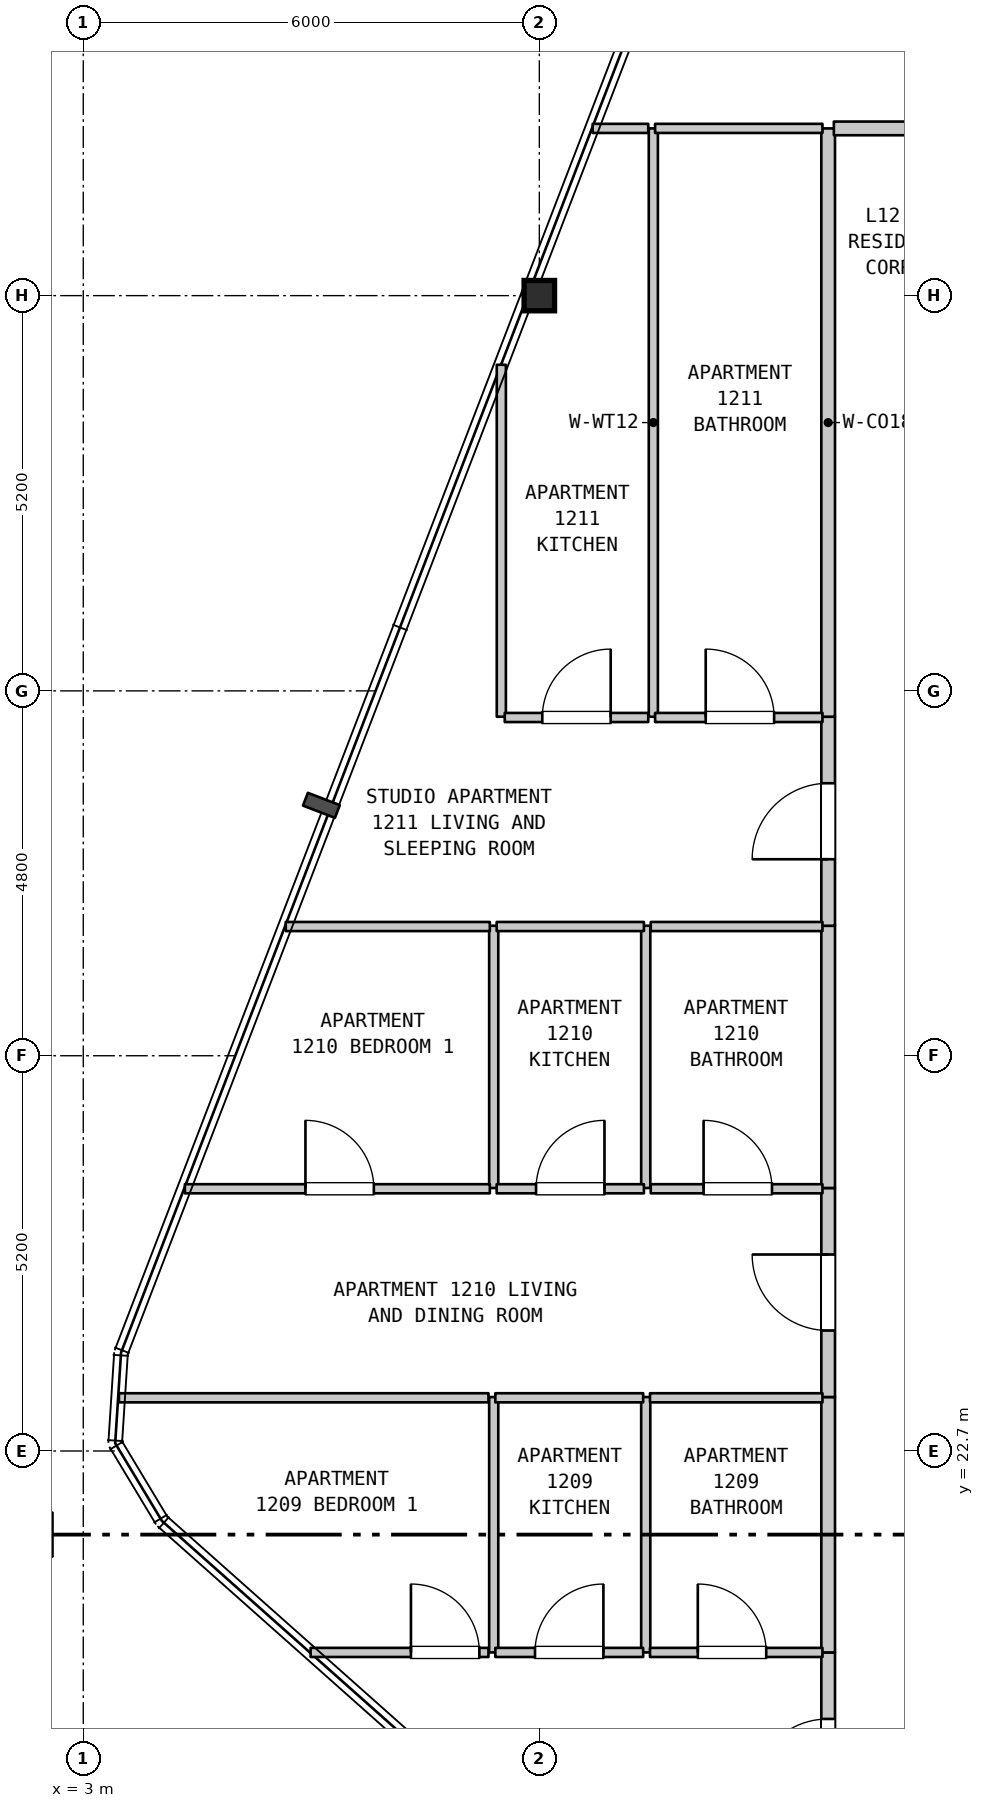
"""IFC4 building model, lengths in metres.
Left out: names, types, materials, properties, quantities, classifications, styles, units other than length and angle.
Written with IfcOpenShell. Run it as: python <this file> out.ifc"""

import sys

from ifc_helpers import new_model, si_unit, direction, frame, frame_2d, origin, origin_2d, place, context, subcontext, project, spatial, rectangle, i_section, extrude, element, fill, save


model = new_model("IFC4")
c1 = context("Model", 3, precision=1e-05, world=origin(), true_north=direction((0.0, 1.0)))
c2 = subcontext(c1, "Body", "Model", "MODEL_VIEW")
j1 = project(units=[si_unit("LENGTHUNIT", "METRE"), si_unit("PLANEANGLEUNIT", "RADIAN")], contexts=[c1])
p1 = place(None, origin())
s1 = spatial("IfcSite", under=j1, at=p1, CompositionType="ELEMENT")
p2 = place(p1, origin())
s2 = spatial("IfcBuilding", under=s1, at=p2, CompositionType="ELEMENT")
p3 = place(p2, frame((0.0, 0.0, 53.6)))
s3 = spatial("IfcBuildingStorey", under=s2, at=p3, CompositionType="ELEMENT", Elevation=53.6)
p4 = place(p3, frame((9.0, 37.9, 0.0), z_axis=(0.0, 0.0, 1.0), x_axis=(1.0, 0.0, 0.0)))
e1 = element("IfcColumn", 1, at=p4, inside=s3, PredefinedType="COLUMN", context=c2, shape_type="SweptSolid", body=[
    extrude(i_section(OverallWidth=0.401, OverallDepth=0.399, WebThickness=0.025, FlangeThickness=0.04, FilletRadius=0.015, at=origin_2d()), origin(), (0.0, 0.0, 1.0), 3.7),
])
p5 = place(p3, frame((8.4, 20.05, 0.0), z_axis=(0.0, 0.0, 1.0), x_axis=(0.0, 1.0, 0.0)))
e2 = element("IfcWall", 2, at=p5, inside=s3, PredefinedType="PARTITIONING", context=c2, shape_type="SweptSolid", body=[
    extrude(rectangle(XDim=3.36, YDim=0.12, at=frame_2d((1.68, 0.0))), origin(), (0.0, 0.0, 1.0), 3.385),
])
p6 = place(p3, frame((8.4, 26.16, 0.0), z_axis=(0.0, 0.0, 1.0), x_axis=(0.0, 1.0, 0.0)))
e3 = element("IfcWall", 3, at=p6, inside=s3, PredefinedType="PARTITIONING", context=c2, shape_type="SweptSolid", body=[
    extrude(rectangle(XDim=3.45, YDim=0.12, at=frame_2d((1.725, 0.0))), origin(), (0.0, 0.0, 1.0), 3.385),
])
p7 = place(p3, frame((8.5, 32.36, 0.0), z_axis=(0.0, 0.0, 1.0), x_axis=(0.0, 1.0, 0.0)))
e4 = element("IfcWall", 4, at=p7, inside=s3, PredefinedType="PARTITIONING", context=c2, shape_type="SweptSolid", body=[
    extrude(rectangle(XDim=4.63, YDim=0.12, at=frame_2d((2.315, 0.0))), origin(), (0.0, 0.0, 1.0), 3.385),
])
p8 = place(p3, frame((10.4, 20.05, 0.0), z_axis=(0.0, 0.0, 1.0), x_axis=(0.0, 1.0, 0.0)))
e5 = element("IfcWall", 5, at=p8, inside=s3, PredefinedType="PARTITIONING", context=c2, shape_type="SweptSolid", body=[
    extrude(rectangle(XDim=3.36, YDim=0.12, at=frame_2d((1.68, 0.0))), origin(), (0.0, 0.0, 1.0), 3.385),
])
p9 = place(p3, frame((10.4, 26.16, 0.0), z_axis=(0.0, 0.0, 1.0), x_axis=(0.0, 1.0, 0.0)))
e6 = element("IfcWall", 6, at=p9, inside=s3, PredefinedType="PARTITIONING", context=c2, shape_type="SweptSolid", body=[
    extrude(rectangle(XDim=3.45, YDim=0.12, at=frame_2d((1.725, 0.0))), origin(), (0.0, 0.0, 1.0), 3.385),
])
p10 = place(p3, frame((10.5, 32.36, 0.0), z_axis=(0.0, 0.0, 1.0), x_axis=(0.0, 1.0, 0.0)))
e7 = element("IfcWall", 7, at=p10, inside=s3, PredefinedType="PARTITIONING", context=c2, shape_type="SweptSolid", body=[
    extrude(rectangle(XDim=7.74, YDim=0.12, at=frame_2d((3.87, 0.0))), origin(), (0.0, 0.0, 1.0), 3.385),
])
p11 = place(p3, frame((12.8, 17.3, 0.0), z_axis=(0.0, 0.0, 1.0), x_axis=(0.0, 1.0, 0.0)))
e8 = element("IfcWall", 8, at=p11, inside=s3, PredefinedType="STANDARD", context=c2, shape_type="SweptSolid", body=[
    extrude(rectangle(XDim=2.75, YDim=0.18, at=frame_2d((1.375, 0.0))), origin(), (0.0, 0.0, 1.0), 3.385),
])
p12 = place(p11, frame((0.875, 0.0, 0.0)))
e9 = element("IfcOpeningElement", 9, at=p12, cuts=e8, PredefinedType="OPENING", context=c2, shape_type="SweptSolid", body=[
    extrude(rectangle(XDim=1.0, YDim=2.15, at=frame_2d((0.5, 1.075))), frame((0.0, 0.1, 0.0), z_axis=(0.0, -1.0, 0.0), x_axis=(1.0, 0.0, 0.0)), (0.0, 0.0, 1.0), 0.2),
])
p13 = place(p3, frame((12.8, 20.05, 0.0), z_axis=(0.0, 0.0, 1.0), x_axis=(0.0, 1.0, 0.0)))
e10 = element("IfcWall", 10, at=p13, inside=s3, PredefinedType="STANDARD", context=c2, shape_type="SweptSolid", body=[
    extrude(rectangle(XDim=3.36, YDim=0.18, at=frame_2d((1.68, 0.0))), origin(), (0.0, 0.0, 1.0), 3.385),
])
p14 = place(p3, frame((12.8, 23.41, 0.0), z_axis=(0.0, 0.0, 1.0), x_axis=(0.0, 1.0, 0.0)))
e11 = element("IfcWall", 11, at=p14, inside=s3, PredefinedType="STANDARD", context=c2, shape_type="SweptSolid", body=[
    extrude(rectangle(XDim=2.75, YDim=0.18, at=frame_2d((1.375, 0.0))), origin(), (0.0, 0.0, 1.0), 3.385),
])
p15 = place(p14, frame((0.875, 0.0, 0.0)))
e12 = element("IfcOpeningElement", 12, at=p15, cuts=e11, PredefinedType="OPENING", context=c2, shape_type="SweptSolid", body=[
    extrude(rectangle(XDim=1.0, YDim=2.15, at=frame_2d((0.5, 1.075))), frame((0.0, 0.1, 0.0), z_axis=(0.0, -1.0, 0.0), x_axis=(1.0, 0.0, 0.0)), (0.0, 0.0, 1.0), 0.2),
])
p16 = place(p3, frame((12.8, 26.16, 0.0), z_axis=(0.0, 0.0, 1.0), x_axis=(0.0, 1.0, 0.0)))
e13 = element("IfcWall", 13, at=p16, inside=s3, PredefinedType="STANDARD", context=c2, shape_type="SweptSolid", body=[
    extrude(rectangle(XDim=3.45, YDim=0.18, at=frame_2d((1.725, 0.0))), origin(), (0.0, 0.0, 1.0), 3.385),
])
p17 = place(p3, frame((12.8, 29.61, 0.0), z_axis=(0.0, 0.0, 1.0), x_axis=(0.0, 1.0, 0.0)))
e14 = element("IfcWall", 14, at=p17, inside=s3, PredefinedType="STANDARD", context=c2, shape_type="SweptSolid", body=[
    extrude(rectangle(XDim=2.75, YDim=0.18, at=frame_2d((1.375, 0.0))), origin(), (0.0, 0.0, 1.0), 3.385),
])
p18 = place(p17, frame((0.875, 0.0, 0.0)))
e15 = element("IfcOpeningElement", 15, at=p18, cuts=e14, PredefinedType="OPENING", context=c2, shape_type="SweptSolid", body=[
    extrude(rectangle(XDim=1.0, YDim=2.15, at=frame_2d((0.5, 1.075))), frame((0.0, 0.1, 0.0), z_axis=(0.0, -1.0, 0.0), x_axis=(1.0, 0.0, 0.0)), (0.0, 0.0, 1.0), 0.2),
])
p19 = place(p3, frame((12.8, 32.36, 0.0), z_axis=(0.0, 0.0, 1.0), x_axis=(0.0, 1.0, 0.0)))
e16 = element("IfcWall", 16, at=p19, inside=s3, PredefinedType="STANDARD", context=c2, shape_type="SweptSolid", body=[
    extrude(rectangle(XDim=7.74, YDim=0.18, at=frame_2d((3.87, 0.0))), origin(), (0.0, 0.0, 1.0), 3.385),
])
p20 = place(p3, frame((5.991, 20.05, 0.0), z_axis=(0.0, 0.0, 1.0), x_axis=(1.0, 0.0, 0.0)))
e17 = element("IfcWall", 17, at=p20, inside=s3, PredefinedType="PARTITIONING", context=c2, shape_type="SweptSolid", body=[
    extrude(rectangle(XDim=2.34, YDim=0.12, at=frame_2d((1.17, 0.0))), origin(), (0.0, 0.0, 1.0), 3.385),
])
p21 = place(p20, frame((1.32, 0.0, 0.0)))
e18 = element("IfcOpeningElement", 18, at=p21, cuts=e17, PredefinedType="OPENING", context=c2, shape_type="SweptSolid", body=[
    extrude(rectangle(XDim=0.9, YDim=2.15, at=frame_2d((0.45, 1.075))), frame((0.0, 0.07, 0.0), z_axis=(0.0, -1.0, 0.0), x_axis=(1.0, 0.0, 0.0)), (0.0, 0.0, 1.0), 0.14),
])
p22 = place(p3, frame((8.421, 20.05, 0.0), z_axis=(0.0, 0.0, 1.0), x_axis=(1.0, 0.0, 0.0)))
e19 = element("IfcWall", 19, at=p22, inside=s3, PredefinedType="PARTITIONING", context=c2, shape_type="SweptSolid", body=[
    extrude(rectangle(XDim=1.945, YDim=0.12, at=frame_2d((0.973, 0.0))), origin(), (0.0, 0.0, 1.0), 3.385),
])
p23 = place(p22, frame((0.522, 0.0, 0.0)))
e20 = element("IfcOpeningElement", 20, at=p23, cuts=e19, PredefinedType="OPENING", context=c2, shape_type="SweptSolid", body=[
    extrude(rectangle(XDim=0.9, YDim=2.15, at=frame_2d((0.45, 1.075))), frame((0.0, 0.07, 0.0), z_axis=(0.0, -1.0, 0.0), x_axis=(1.0, 0.0, 0.0)), (0.0, 0.0, 1.0), 0.14),
])
p24 = place(p3, frame((10.456, 20.05, 0.0), z_axis=(0.0, 0.0, 1.0), x_axis=(1.0, 0.0, 0.0)))
e21 = element("IfcWall", 21, at=p24, inside=s3, PredefinedType="PARTITIONING", context=c2, shape_type="SweptSolid", body=[
    extrude(rectangle(XDim=2.269, YDim=0.12, at=frame_2d((1.135, 0.0))), origin(), (0.0, 0.0, 1.0), 3.385),
])
p25 = place(p24, frame((0.629, 0.0, 0.0)))
e22 = element("IfcOpeningElement", 22, at=p25, cuts=e21, PredefinedType="OPENING", context=c2, shape_type="SweptSolid", body=[
    extrude(rectangle(XDim=0.9, YDim=2.1, at=frame_2d((0.45, 1.05))), frame((0.0, 0.07, 0.0), z_axis=(0.0, -1.0, 0.0), x_axis=(1.0, 0.0, 0.0)), (0.0, 0.0, 1.0), 0.14),
])
p26 = place(p3, frame((3.469, 23.4, 0.0), z_axis=(0.0, 0.0, 1.0), x_axis=(1.0, 0.0, 0.0)))
e23 = element("IfcWall", 23, at=p26, inside=s3, PredefinedType="PARTITIONING", context=c2, shape_type="SweptSolid", body=[
    extrude(rectangle(XDim=4.862, YDim=0.12, at=frame_2d((2.431, 0.0))), origin(), (0.0, 0.0, 1.0), 3.385),
])
p27 = place(p3, frame((8.421, 23.4, 0.0), z_axis=(0.0, 0.0, 1.0), x_axis=(1.0, 0.0, 0.0)))
e24 = element("IfcWall", 24, at=p27, inside=s3, PredefinedType="PARTITIONING", context=c2, shape_type="SweptSolid", body=[
    extrude(rectangle(XDim=1.945, YDim=0.12, at=frame_2d((0.973, 0.0))), origin(), (0.0, 0.0, 1.0), 3.385),
])
p28 = place(p3, frame((10.456, 23.4, 0.0), z_axis=(0.0, 0.0, 1.0), x_axis=(1.0, 0.0, 0.0)))
e25 = element("IfcWall", 25, at=p28, inside=s3, PredefinedType="PARTITIONING", context=c2, shape_type="SweptSolid", body=[
    extrude(rectangle(XDim=2.269, YDim=0.12, at=frame_2d((1.135, 0.0))), origin(), (0.0, 0.0, 1.0), 3.385),
])
p29 = place(p3, frame((4.337, 26.15, 0.0), z_axis=(0.0, 0.0, 1.0), x_axis=(1.0, 0.0, 0.0)))
e26 = element("IfcWall", 26, at=p29, inside=s3, PredefinedType="PARTITIONING", context=c2, shape_type="SweptSolid", body=[
    extrude(rectangle(XDim=4.012, YDim=0.12, at=frame_2d((2.006, 0.0))), origin(), (0.0, 0.0, 1.0), 3.385),
])
p30 = place(p29, frame((1.586, 0.0, 0.0)))
e27 = element("IfcOpeningElement", 27, at=p30, cuts=e26, PredefinedType="OPENING", context=c2, shape_type="SweptSolid", body=[
    extrude(rectangle(XDim=0.9, YDim=2.15, at=frame_2d((0.45, 1.075))), frame((0.0, 0.07, 0.0), z_axis=(0.0, -1.0, 0.0), x_axis=(1.0, 0.0, 0.0)), (0.0, 0.0, 1.0), 0.14),
])
p31 = place(p3, frame((8.439, 26.15, 0.0), z_axis=(0.0, 0.0, 1.0), x_axis=(1.0, 0.0, 0.0)))
e28 = element("IfcWall", 28, at=p31, inside=s3, PredefinedType="PARTITIONING", context=c2, shape_type="SweptSolid", body=[
    extrude(rectangle(XDim=1.937, YDim=0.12, at=frame_2d((0.969, 0.0))), origin(), (0.0, 0.0, 1.0), 3.385),
])
p32 = place(p31, frame((0.518, 0.0, 0.0)))
e29 = element("IfcOpeningElement", 29, at=p32, cuts=e28, PredefinedType="OPENING", context=c2, shape_type="SweptSolid", body=[
    extrude(rectangle(XDim=0.9, YDim=2.15, at=frame_2d((0.45, 1.075))), frame((0.0, 0.07, 0.0), z_axis=(0.0, -1.0, 0.0), x_axis=(1.0, 0.0, 0.0)), (0.0, 0.0, 1.0), 0.14),
])
p33 = place(p3, frame((10.466, 26.15, 0.0), z_axis=(0.0, 0.0, 1.0), x_axis=(1.0, 0.0, 0.0)))
e30 = element("IfcWall", 30, at=p33, inside=s3, PredefinedType="PARTITIONING", context=c2, shape_type="SweptSolid", body=[
    extrude(rectangle(XDim=2.259, YDim=0.12, at=frame_2d((1.129, 0.0))), origin(), (0.0, 0.0, 1.0), 3.385),
])
p34 = place(p33, frame((0.695, 0.0, 0.0)))
e31 = element("IfcOpeningElement", 31, at=p34, cuts=e30, PredefinedType="OPENING", context=c2, shape_type="SweptSolid", body=[
    extrude(rectangle(XDim=0.9, YDim=2.1, at=frame_2d((0.45, 1.05))), frame((0.0, 0.07, 0.0), z_axis=(0.0, -1.0, 0.0), x_axis=(1.0, 0.0, 0.0)), (0.0, 0.0, 1.0), 0.14),
])
p35 = place(p3, frame((5.664, 29.6, 0.0), z_axis=(0.0, 0.0, 1.0), x_axis=(1.0, 0.0, 0.0)))
e32 = element("IfcWall", 32, at=p35, inside=s3, PredefinedType="PARTITIONING", context=c2, shape_type="SweptSolid", body=[
    extrude(rectangle(XDim=2.685, YDim=0.12, at=frame_2d((1.343, 0.0))), origin(), (0.0, 0.0, 1.0), 3.385),
])
p36 = place(p3, frame((8.439, 29.6, 0.0), z_axis=(0.0, 0.0, 1.0), x_axis=(1.0, 0.0, 0.0)))
e33 = element("IfcWall", 33, at=p36, inside=s3, PredefinedType="PARTITIONING", context=c2, shape_type="SweptSolid", body=[
    extrude(rectangle(XDim=1.937, YDim=0.12, at=frame_2d((0.969, 0.0))), origin(), (0.0, 0.0, 1.0), 3.385),
])
p37 = place(p3, frame((10.466, 29.6, 0.0), z_axis=(0.0, 0.0, 1.0), x_axis=(1.0, 0.0, 0.0)))
e34 = element("IfcWall", 34, at=p37, inside=s3, PredefinedType="PARTITIONING", context=c2, shape_type="SweptSolid", body=[
    extrude(rectangle(XDim=2.259, YDim=0.12, at=frame_2d((1.129, 0.0))), origin(), (0.0, 0.0, 1.0), 3.385),
])
p38 = place(p3, frame((8.545, 32.35, 0.0), z_axis=(0.0, 0.0, 1.0), x_axis=(1.0, 0.0, 0.0)))
e35 = element("IfcWall", 35, at=p38, inside=s3, PredefinedType="PARTITIONING", context=c2, shape_type="SweptSolid", body=[
    extrude(rectangle(XDim=1.888, YDim=0.12, at=frame_2d((0.944, 0.0))), origin(), (0.0, 0.0, 1.0), 3.385),
])
p39 = place(p38, frame((0.494, 0.0, 0.0)))
e36 = element("IfcOpeningElement", 36, at=p39, cuts=e35, PredefinedType="OPENING", context=c2, shape_type="SweptSolid", body=[
    extrude(rectangle(XDim=0.9, YDim=2.15, at=frame_2d((0.45, 1.075))), frame((0.0, 0.07, 0.0), z_axis=(0.0, -1.0, 0.0), x_axis=(1.0, 0.0, 0.0)), (0.0, 0.0, 1.0), 0.14),
])
p40 = place(p3, frame((10.523, 32.35, 0.0), z_axis=(0.0, 0.0, 1.0), x_axis=(1.0, 0.0, 0.0)))
e37 = element("IfcWall", 37, at=p40, inside=s3, PredefinedType="PARTITIONING", context=c2, shape_type="SweptSolid", body=[
    extrude(rectangle(XDim=2.202, YDim=0.12, at=frame_2d((1.101, 0.0))), origin(), (0.0, 0.0, 1.0), 3.385),
])
p41 = place(p40, frame((0.666, 0.0, 0.0)))
e38 = element("IfcOpeningElement", 38, at=p41, cuts=e37, PredefinedType="OPENING", context=c2, shape_type="SweptSolid", body=[
    extrude(rectangle(XDim=0.9, YDim=2.1, at=frame_2d((0.45, 1.05))), frame((0.0, 0.07, 0.0), z_axis=(0.0, -1.0, 0.0), x_axis=(1.0, 0.0, 0.0)), (0.0, 0.0, 1.0), 0.14),
])
p42 = place(p3, frame((9.702, 40.1, 0.0), z_axis=(0.0, 0.0, 1.0), x_axis=(1.0, 0.0, 0.0)))
e39 = element("IfcWall", 39, at=p42, inside=s3, PredefinedType="PARTITIONING", context=c2, shape_type="SweptSolid", body=[
    extrude(rectangle(XDim=0.731, YDim=0.12, at=frame_2d((0.366, 0.0))), origin(), (0.0, 0.0, 1.0), 3.385),
])
p43 = place(p3, frame((10.523, 40.1, 0.0), z_axis=(0.0, 0.0, 1.0), x_axis=(1.0, 0.0, 0.0)))
e40 = element("IfcWall", 40, at=p43, inside=s3, PredefinedType="PARTITIONING", context=c2, shape_type="SweptSolid", body=[
    extrude(rectangle(XDim=2.202, YDim=0.12, at=frame_2d((1.101, 0.0))), origin(), (0.0, 0.0, 1.0), 3.385),
])
p44 = place(p3, frame((12.875, 40.1, 0.0), z_axis=(0.0, 0.0, 1.0), x_axis=(1.0, 0.0, 0.0)))
e41 = element("IfcWall", 41, at=p44, inside=s3, PredefinedType="STANDARD", context=c2, shape_type="SweptSolid", body=[
    extrude(rectangle(XDim=3.23, YDim=0.18, at=frame_2d((1.615, 0.0))), origin(), (0.0, 0.0, 1.0), 3.385),
])
p45 = place(p44, frame((1.029, 0.0, 0.0)))
e42 = element("IfcOpeningElement", 42, at=p45, cuts=e41, PredefinedType="OPENING", context=c2, shape_type="SweptSolid", body=[
    extrude(rectangle(XDim=1.0, YDim=2.15, at=frame_2d((0.5, 1.075))), frame((0.0, 0.1, 0.0), z_axis=(0.0, -1.0, 0.0), x_axis=(1.0, 0.0, 0.0)), (0.0, 0.0, 1.0), 0.2),
])
p46 = place(p12, origin())
e43 = element("IfcDoor", 43, at=p46, inside=s3, OperationType="SINGLE_SWING_LEFT", PredefinedType="DOOR", context=c2, shape_type="SweptSolid", body=[
    extrude(rectangle(XDim=1.0, YDim=2.15, at=frame_2d((0.5, 1.075))), frame((0.0, 0.025, 0.0), z_axis=(0.0, -1.0, 0.0), x_axis=(1.0, 0.0, 0.0)), (0.0, 0.0, 1.0), 0.05),
])
fill(e9, e43)
p47 = place(p15, origin())
e44 = element("IfcDoor", 44, at=p47, inside=s3, OperationType="SINGLE_SWING_RIGHT", PredefinedType="DOOR", context=c2, shape_type="SweptSolid", body=[
    extrude(rectangle(XDim=1.0, YDim=2.15, at=frame_2d((0.5, 1.075))), frame((0.0, 0.025, 0.0), z_axis=(0.0, -1.0, 0.0), x_axis=(1.0, 0.0, 0.0)), (0.0, 0.0, 1.0), 0.05),
])
fill(e12, e44)
p48 = place(p18, origin())
e45 = element("IfcDoor", 45, at=p48, inside=s3, OperationType="SINGLE_SWING_LEFT", PredefinedType="DOOR", context=c2, shape_type="SweptSolid", body=[
    extrude(rectangle(XDim=1.0, YDim=2.15, at=frame_2d((0.5, 1.075))), frame((0.0, 0.025, 0.0), z_axis=(0.0, -1.0, 0.0), x_axis=(1.0, 0.0, 0.0)), (0.0, 0.0, 1.0), 0.05),
])
fill(e15, e45)
p49 = place(p21, origin())
e46 = element("IfcDoor", 46, at=p49, inside=s3, OperationType="SINGLE_SWING_LEFT", PredefinedType="DOOR", context=c2, shape_type="SweptSolid", body=[
    extrude(rectangle(XDim=0.9, YDim=2.15, at=frame_2d((0.45, 1.075))), frame((0.0, 0.025, 0.0), z_axis=(0.0, -1.0, 0.0), x_axis=(1.0, 0.0, 0.0)), (0.0, 0.0, 1.0), 0.05),
])
fill(e18, e46)
p50 = place(p23, origin())
e47 = element("IfcDoor", 47, at=p50, inside=s3, OperationType="SINGLE_SWING_RIGHT", PredefinedType="DOOR", context=c2, shape_type="SweptSolid", body=[
    extrude(rectangle(XDim=0.9, YDim=2.15, at=frame_2d((0.45, 1.075))), frame((0.0, 0.025, 0.0), z_axis=(0.0, -1.0, 0.0), x_axis=(1.0, 0.0, 0.0)), (0.0, 0.0, 1.0), 0.05),
])
fill(e20, e47)
p51 = place(p25, origin())
e48 = element("IfcDoor", 48, at=p51, inside=s3, OperationType="SINGLE_SWING_LEFT", PredefinedType="DOOR", context=c2, shape_type="SweptSolid", body=[
    extrude(rectangle(XDim=0.9, YDim=2.1, at=frame_2d((0.45, 1.05))), frame((0.0, 0.025, 0.0), z_axis=(0.0, -1.0, 0.0), x_axis=(1.0, 0.0, 0.0)), (0.0, 0.0, 1.0), 0.05),
])
fill(e22, e48)
p52 = place(p30, origin())
e49 = element("IfcDoor", 49, at=p52, inside=s3, OperationType="SINGLE_SWING_LEFT", PredefinedType="DOOR", context=c2, shape_type="SweptSolid", body=[
    extrude(rectangle(XDim=0.9, YDim=2.15, at=frame_2d((0.45, 1.075))), frame((0.0, 0.025, 0.0), z_axis=(0.0, -1.0, 0.0), x_axis=(1.0, 0.0, 0.0)), (0.0, 0.0, 1.0), 0.05),
])
fill(e27, e49)
p53 = place(p32, origin())
e50 = element("IfcDoor", 50, at=p53, inside=s3, OperationType="SINGLE_SWING_RIGHT", PredefinedType="DOOR", context=c2, shape_type="SweptSolid", body=[
    extrude(rectangle(XDim=0.9, YDim=2.15, at=frame_2d((0.45, 1.075))), frame((0.0, 0.025, 0.0), z_axis=(0.0, -1.0, 0.0), x_axis=(1.0, 0.0, 0.0)), (0.0, 0.0, 1.0), 0.05),
])
fill(e29, e50)
p54 = place(p34, origin())
e51 = element("IfcDoor", 51, at=p54, inside=s3, OperationType="SINGLE_SWING_LEFT", PredefinedType="DOOR", context=c2, shape_type="SweptSolid", body=[
    extrude(rectangle(XDim=0.9, YDim=2.1, at=frame_2d((0.45, 1.05))), frame((0.0, 0.025, 0.0), z_axis=(0.0, -1.0, 0.0), x_axis=(1.0, 0.0, 0.0)), (0.0, 0.0, 1.0), 0.05),
])
fill(e31, e51)
p55 = place(p39, origin())
e52 = element("IfcDoor", 52, at=p55, inside=s3, OperationType="SINGLE_SWING_RIGHT", PredefinedType="DOOR", context=c2, shape_type="SweptSolid", body=[
    extrude(rectangle(XDim=0.9, YDim=2.15, at=frame_2d((0.45, 1.075))), frame((0.0, 0.025, 0.0), z_axis=(0.0, -1.0, 0.0), x_axis=(1.0, 0.0, 0.0)), (0.0, 0.0, 1.0), 0.05),
])
fill(e36, e52)
p56 = place(p41, origin())
e53 = element("IfcDoor", 53, at=p56, inside=s3, OperationType="SINGLE_SWING_LEFT", PredefinedType="DOOR", context=c2, shape_type="SweptSolid", body=[
    extrude(rectangle(XDim=0.9, YDim=2.1, at=frame_2d((0.45, 1.05))), frame((0.0, 0.025, 0.0), z_axis=(0.0, -1.0, 0.0), x_axis=(1.0, 0.0, 0.0)), (0.0, 0.0, 1.0), 0.05),
])
fill(e38, e53)
save(model, sys.argv[1])
